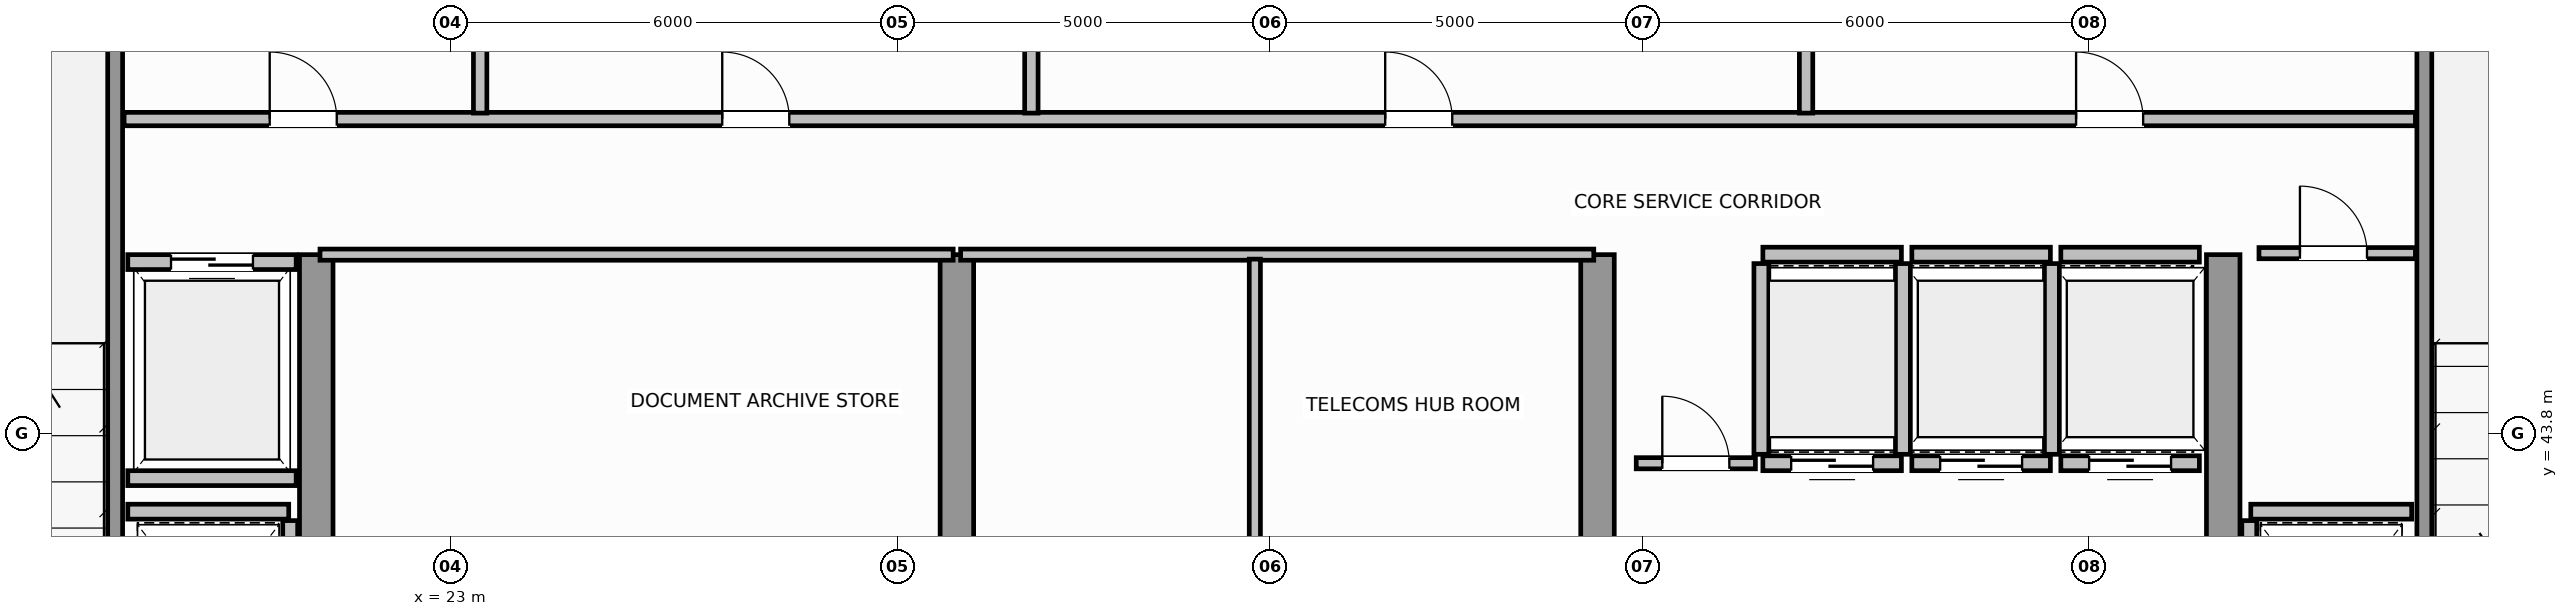
"""IFC4 building model, lengths in metres.
Left out: names, types, materials, properties, quantities, classifications, styles, units other than length and angle.
Written with IfcOpenShell. Run it as: python <this file> out.ifc"""

import sys

from ifc_helpers import new_model, si_unit, direction, frame, frame_2d, origin, place, context, subcontext, project, spatial, rectangle, extrude, source, transform, mapped, element, fill, save


model = new_model("IFC4")
c1 = context("Model", 3, precision=1e-05, world=origin(), true_north=direction((0.0, 1.0)))
c2 = subcontext(c1, "Body", "Model", "MODEL_VIEW")
j1 = project(units=[si_unit("LENGTHUNIT", "METRE"), si_unit("PLANEANGLEUNIT", "RADIAN")], contexts=[c1])
p1 = place(None, origin())
s1 = spatial("IfcSite", under=j1, at=p1, CompositionType="ELEMENT")
p2 = place(p1, origin())
s2 = spatial("IfcBuilding", under=s1, at=p2, CompositionType="ELEMENT")
p3 = place(p2, frame((0.0, 0.0, 268.8)))
s3 = spatial("IfcBuildingStorey", under=s2, at=p3, CompositionType="ELEMENT", Elevation=268.8)
for number, where, z_axis, x_axis in (
    (1, (21.2, 36.745, 0.0), (0.0, 0.0, 1.0), (0.0, 1.0, 0.0)),
    (2, (29.8, 36.745, 0.0), (0.0, 0.0, 1.0), (0.0, 1.0, 0.0)),
    (3, (38.4, 36.745, 0.0), (0.0, 0.0, 1.0), (0.0, 1.0, 0.0)),
    (4, (46.8, 36.745, 0.0), (0.0, 0.0, 1.0), (0.0, 1.0, 0.0)),
):
    element("IfcWall", number, at=place(p3, frame(where, z_axis=z_axis, x_axis=x_axis)), inside=s3, PredefinedType="SHEAR", context=c2, shape_type="SweptSolid", body=[
        extrude(rectangle(XDim=9.455, YDim=0.45, at=frame_2d((4.728, 0.0))), origin(), (0.0, 0.0, 1.0), 3.8),
    ])
for number, where, z_axis, x_axis in (
    (5, (18.5, 39.96, 0.0), (0.0, 0.0, 1.0), (0.0, 1.0, 0.0)),
    (6, (49.5, 39.96, 0.0), (0.0, 0.0, 1.0), (0.0, 1.0, 0.0)),
):
    element("IfcWall", number, at=place(p3, frame(where, z_axis=z_axis, x_axis=x_axis)), inside=s3, PredefinedType="SOLIDWALL", context=c2, shape_type="SweptSolid", body=[
        extrude(rectangle(XDim=9.93, YDim=0.2, at=frame_2d((4.965, 0.0))), origin(), (0.0, 0.0, 1.0), 3.8),
    ])
p4 = place(p3, frame((40.62, 43.4, 0.0), z_axis=(0.0, 0.0, 1.0), x_axis=(1.0, 0.0, 0.0)))
e7 = element("IfcWall", 7, at=p4, inside=s3, PredefinedType="SOLIDWALL", context=c2, shape_type="SweptSolid", body=[
    extrude(rectangle(XDim=1.86, YDim=0.2, at=frame_2d((0.93, 0.0))), origin(), (0.0, 0.0, 1.0), 3.58),
])
p5 = place(p4, frame((0.38, 0.0, 0.0)))
e8 = element("IfcOpeningElement", 8, at=p5, cuts=e7, PredefinedType="OPENING", context=c2, shape_type="SweptSolid", body=[
    extrude(rectangle(XDim=1.1, YDim=2.15, at=frame_2d((0.55, 1.075))), frame((0.0, 0.11, 0.0), z_axis=(0.0, -1.0, 0.0), x_axis=(1.0, 0.0, 0.0)), (0.0, 0.0, 1.0), 0.22),
])
p6 = place(p3, frame((40.62, 46.2, 0.0), z_axis=(0.0, 0.0, 1.0), x_axis=(1.0, 0.0, 0.0)))
e9 = element("IfcWall", 9, at=p6, inside=s3, PredefinedType="SOLIDWALL", context=c2, shape_type="SweptSolid", body=[
    extrude(rectangle(XDim=1.86, YDim=0.2, at=frame_2d((0.93, 0.0))), origin(), (0.0, 0.0, 1.0), 3.58),
])
for number, where, z_axis, x_axis in (
    (10, (40.6, 43.52, 0.0), (0.0, 0.0, 1.0), (0.0, 1.0, 0.0)),
    (11, (42.5, 43.52, 0.0), (0.0, 0.0, 1.0), (0.0, 1.0, 0.0)),
):
    element("IfcWall", number, at=place(p3, frame(where, z_axis=z_axis, x_axis=x_axis)), inside=s3, PredefinedType="SOLIDWALL", context=c2, shape_type="SweptSolid", body=[
        extrude(rectangle(XDim=2.56, YDim=0.2, at=frame_2d((1.28, 0.0))), origin(), (0.0, 0.0, 1.0), 3.58),
    ])
p7 = place(p3, frame((42.62, 43.4, 0.0), z_axis=(0.0, 0.0, 1.0), x_axis=(1.0, 0.0, 0.0)))
e12 = element("IfcWall", 12, at=p7, inside=s3, PredefinedType="SOLIDWALL", context=c2, shape_type="SweptSolid", body=[
    extrude(rectangle(XDim=1.86, YDim=0.2, at=frame_2d((0.93, 0.0))), origin(), (0.0, 0.0, 1.0), 3.58),
])
p8 = place(p7, frame((0.38, 0.0, 0.0)))
e13 = element("IfcOpeningElement", 13, at=p8, cuts=e12, PredefinedType="OPENING", context=c2, shape_type="SweptSolid", body=[
    extrude(rectangle(XDim=1.1, YDim=2.15, at=frame_2d((0.55, 1.075))), frame((0.0, 0.11, 0.0), z_axis=(0.0, -1.0, 0.0), x_axis=(1.0, 0.0, 0.0)), (0.0, 0.0, 1.0), 0.22),
])
p9 = place(p3, frame((42.62, 46.2, 0.0), z_axis=(0.0, 0.0, 1.0), x_axis=(1.0, 0.0, 0.0)))
e14 = element("IfcWall", 14, at=p9, inside=s3, PredefinedType="SOLIDWALL", context=c2, shape_type="SweptSolid", body=[
    extrude(rectangle(XDim=1.86, YDim=0.2, at=frame_2d((0.93, 0.0))), origin(), (0.0, 0.0, 1.0), 3.58),
])
p10 = place(p3, frame((44.5, 43.52, 0.0), z_axis=(0.0, 0.0, 1.0), x_axis=(0.0, 1.0, 0.0)))
e15 = element("IfcWall", 15, at=p10, inside=s3, PredefinedType="SOLIDWALL", context=c2, shape_type="SweptSolid", body=[
    extrude(rectangle(XDim=2.56, YDim=0.2, at=frame_2d((1.28, 0.0))), origin(), (0.0, 0.0, 1.0), 3.58),
])
p11 = place(p3, frame((44.62, 43.4, 0.0), z_axis=(0.0, 0.0, 1.0), x_axis=(1.0, 0.0, 0.0)))
e16 = element("IfcWall", 16, at=p11, inside=s3, PredefinedType="SOLIDWALL", context=c2, shape_type="SweptSolid", body=[
    extrude(rectangle(XDim=1.86, YDim=0.2, at=frame_2d((0.93, 0.0))), origin(), (0.0, 0.0, 1.0), 3.58),
])
p12 = place(p11, frame((0.38, 0.0, 0.0)))
e17 = element("IfcOpeningElement", 17, at=p12, cuts=e16, PredefinedType="OPENING", context=c2, shape_type="SweptSolid", body=[
    extrude(rectangle(XDim=1.1, YDim=2.15, at=frame_2d((0.55, 1.075))), frame((0.0, 0.11, 0.0), z_axis=(0.0, -1.0, 0.0), x_axis=(1.0, 0.0, 0.0)), (0.0, 0.0, 1.0), 0.22),
])
p13 = place(p3, frame((44.62, 46.2, 0.0), z_axis=(0.0, 0.0, 1.0), x_axis=(1.0, 0.0, 0.0)))
e18 = element("IfcWall", 18, at=p13, inside=s3, PredefinedType="SOLIDWALL", context=c2, shape_type="SweptSolid", body=[
    extrude(rectangle(XDim=1.86, YDim=0.2, at=frame_2d((0.93, 0.0))), origin(), (0.0, 0.0, 1.0), 3.58),
])
p14 = place(p3, frame((18.67, 46.1, 0.0), z_axis=(0.0, 0.0, 1.0), x_axis=(1.0, 0.0, 0.0)))
e19 = element("IfcWall", 19, at=p14, inside=s3, PredefinedType="SOLIDWALL", context=c2, shape_type="SweptSolid", body=[
    extrude(rectangle(XDim=2.26, YDim=0.2, at=frame_2d((1.13, 0.0))), origin(), (0.0, 0.0, 1.0), 3.58),
])
p15 = place(p14, frame((0.58, 0.0, 0.0)))
e20 = element("IfcOpeningElement", 20, at=p15, cuts=e19, PredefinedType="OPENING", context=c2, shape_type="SweptSolid", body=[
    extrude(rectangle(XDim=1.1, YDim=2.15, at=frame_2d((0.55, 1.075))), frame((0.0, 0.11, 0.0), z_axis=(0.0, -1.0, 0.0), x_axis=(1.0, 0.0, 0.0)), (0.0, 0.0, 1.0), 0.22),
])
p16 = place(p3, frame((18.67, 43.2, 0.0), z_axis=(0.0, 0.0, 1.0), x_axis=(1.0, 0.0, 0.0)))
e21 = element("IfcWall", 21, at=p16, inside=s3, PredefinedType="SOLIDWALL", context=c2, shape_type="SweptSolid", body=[
    extrude(rectangle(XDim=2.26, YDim=0.2, at=frame_2d((1.13, 0.0))), origin(), (0.0, 0.0, 1.0), 3.58),
])
p17 = place(p3, frame((18.67, 42.75, 0.0), z_axis=(0.0, 0.0, 1.0), x_axis=(1.0, 0.0, 0.0)))
e22 = element("IfcWall", 22, at=p17, inside=s3, PredefinedType="SOLIDWALL", context=c2, shape_type="SweptSolid", body=[
    extrude(rectangle(XDim=2.16, YDim=0.2, at=frame_2d((1.08, 0.0))), origin(), (0.0, 0.0, 1.0), 3.58),
])
p18 = place(p3, frame((20.85, 40.07, 0.0), z_axis=(0.0, 0.0, 1.0), x_axis=(0.0, 1.0, 0.0)))
e23 = element("IfcWall", 23, at=p18, inside=s3, PredefinedType="SOLIDWALL", context=c2, shape_type="SweptSolid", body=[
    extrude(rectangle(XDim=2.56, YDim=0.2, at=frame_2d((1.28, 0.0))), origin(), (0.0, 0.0, 1.0), 3.58),
])
p19 = place(p3, frame((47.17, 42.75, 0.0), z_axis=(0.0, 0.0, 1.0), x_axis=(1.0, 0.0, 0.0)))
e24 = element("IfcWall", 24, at=p19, inside=s3, PredefinedType="SOLIDWALL", context=c2, shape_type="SweptSolid", body=[
    extrude(rectangle(XDim=2.16, YDim=0.2, at=frame_2d((1.08, 0.0))), origin(), (0.0, 0.0, 1.0), 3.58),
])
p20 = place(p3, frame((47.15, 40.07, 0.0), z_axis=(0.0, 0.0, 1.0), x_axis=(0.0, 1.0, 0.0)))
e25 = element("IfcWall", 25, at=p20, inside=s3, PredefinedType="SOLIDWALL", context=c2, shape_type="SweptSolid", body=[
    extrude(rectangle(XDim=2.56, YDim=0.2, at=frame_2d((1.28, 0.0))), origin(), (0.0, 0.0, 1.0), 3.58),
])
for number, where, z_axis, x_axis in (
    (26, (21.25, 46.2, 0.0), (0.0, 0.0, 1.0), (1.0, 0.0, 0.0)),
    (27, (29.85, 46.2, 0.0), (0.0, 0.0, 1.0), (1.0, 0.0, 0.0)),
):
    element("IfcWall", number, at=place(p3, frame(where, z_axis=z_axis, x_axis=x_axis)), inside=s3, PredefinedType="PARTITIONING", context=c2, shape_type="SweptSolid", body=[
        extrude(rectangle(XDim=8.5, YDim=0.15, at=frame_2d((4.25, 0.0))), origin(), (0.0, 0.0, 1.0), 3.58),
    ])
p21 = place(p3, frame((33.8, 36.56, 0.0), z_axis=(0.0, 0.0, 1.0), x_axis=(0.0, 1.0, 0.0)))
e28 = element("IfcWall", 28, at=p21, inside=s3, PredefinedType="PARTITIONING", context=c2, shape_type="SweptSolid", body=[
    extrude(rectangle(XDim=9.58, YDim=0.15, at=frame_2d((4.79, 0.0))), origin(), (0.0, 0.0, 1.0), 3.58),
])
p22 = place(p21, frame((4.2, 0.0, 0.0)))
e29 = element("IfcOpeningElement", 29, at=p22, cuts=e28, PredefinedType="OPENING", context=c2, shape_type="SweptSolid", body=[
    extrude(rectangle(XDim=0.9, YDim=2.1, at=frame_2d((0.45, 1.05))), frame((0.0, 0.085, 0.0), z_axis=(0.0, -1.0, 0.0), x_axis=(1.0, 0.0, 0.0)), (0.0, 0.0, 1.0), 0.17),
])
p23 = place(p3, frame((47.28, 46.22, 0.0), z_axis=(0.0, 0.0, 1.0), x_axis=(1.0, 0.0, 0.0)))
e30 = element("IfcWall", 30, at=p23, inside=s3, PredefinedType="PARTITIONING", context=c2, shape_type="SweptSolid", body=[
    extrude(rectangle(XDim=2.1, YDim=0.15, at=frame_2d((1.05, 0.0))), origin(), (0.0, 0.0, 1.0), 3.58),
])
p24 = place(p23, frame((0.55, 0.0, 0.0)))
e31 = element("IfcOpeningElement", 31, at=p24, cuts=e30, PredefinedType="OPENING", context=c2, shape_type="SweptSolid", body=[
    extrude(rectangle(XDim=0.9, YDim=2.1, at=frame_2d((0.45, 1.05))), frame((0.0, 0.085, 0.0), z_axis=(0.0, -1.0, 0.0), x_axis=(1.0, 0.0, 0.0)), (0.0, 0.0, 1.0), 0.17),
])
p25 = place(p3, frame((38.92, 43.4, 0.0), z_axis=(0.0, 0.0, 1.0), x_axis=(1.0, 0.0, 0.0)))
e32 = element("IfcWall", 32, at=p25, inside=s3, PredefinedType="PARTITIONING", context=c2, shape_type="SweptSolid", body=[
    extrude(rectangle(XDim=1.6, YDim=0.15, at=frame_2d((0.8, 0.0))), origin(), (0.0, 0.0, 1.0), 3.58),
])
p26 = place(p25, frame((0.35, 0.0, 0.0)))
e33 = element("IfcOpeningElement", 33, at=p26, cuts=e32, PredefinedType="OPENING", context=c2, shape_type="SweptSolid", body=[
    extrude(rectangle(XDim=0.9, YDim=2.1, at=frame_2d((0.45, 1.05))), frame((0.0, 0.085, 0.0), z_axis=(0.0, -1.0, 0.0), x_axis=(1.0, 0.0, 0.0)), (0.0, 0.0, 1.0), 0.17),
])
p27 = place(p3, frame((18.62, 48.02, 0.0), z_axis=(0.0, 0.0, 1.0), x_axis=(1.0, 0.0, 0.0)))
e34 = element("IfcWall", 34, at=p27, inside=s3, PredefinedType="PLUMBINGWALL", context=c2, shape_type="SweptSolid", body=[
    extrude(rectangle(XDim=30.76, YDim=0.18, at=frame_2d((15.38, 0.0))), origin(), (0.0, 0.0, 1.0), 3.58),
])
p28 = place(p27, frame((1.955, 0.0, 0.0)))
e35 = element("IfcOpeningElement", 35, at=p28, cuts=e34, PredefinedType="OPENING", context=c2, shape_type="SweptSolid", body=[
    extrude(rectangle(XDim=0.9, YDim=2.15, at=frame_2d((0.45, 1.075))), frame((0.0, 0.1, 0.0), z_axis=(0.0, -1.0, 0.0), x_axis=(1.0, 0.0, 0.0)), (0.0, 0.0, 1.0), 0.2),
])
p29 = place(p27, frame((8.03, 0.0, 0.0)))
e36 = element("IfcOpeningElement", 36, at=p29, cuts=e34, PredefinedType="OPENING", context=c2, shape_type="SweptSolid", body=[
    extrude(rectangle(XDim=0.9, YDim=2.15, at=frame_2d((0.45, 1.075))), frame((0.0, 0.1, 0.0), z_axis=(0.0, -1.0, 0.0), x_axis=(1.0, 0.0, 0.0)), (0.0, 0.0, 1.0), 0.2),
])
p30 = place(p27, frame((16.93, 0.0, 0.0)))
e37 = element("IfcOpeningElement", 37, at=p30, cuts=e34, PredefinedType="OPENING", context=c2, shape_type="SweptSolid", body=[
    extrude(rectangle(XDim=0.9, YDim=2.15, at=frame_2d((0.45, 1.075))), frame((0.0, 0.1, 0.0), z_axis=(0.0, -1.0, 0.0), x_axis=(1.0, 0.0, 0.0)), (0.0, 0.0, 1.0), 0.2),
])
p31 = place(p27, frame((26.205, 0.0, 0.0)))
e38 = element("IfcOpeningElement", 38, at=p31, cuts=e34, PredefinedType="OPENING", context=c2, shape_type="SweptSolid", body=[
    extrude(rectangle(XDim=0.9, YDim=2.15, at=frame_2d((0.45, 1.075))), frame((0.0, 0.1, 0.0), z_axis=(0.0, -1.0, 0.0), x_axis=(1.0, 0.0, 0.0)), (0.0, 0.0, 1.0), 0.2),
])
for number, where, z_axis, x_axis in (
    (39, (23.4, 48.1, 0.0), (0.0, 0.0, 1.0), (0.0, 1.0, 0.0)),
    (40, (30.8, 48.1, 0.0), (0.0, 0.0, 1.0), (0.0, 1.0, 0.0)),
    (41, (41.2, 48.1, 0.0), (0.0, 0.0, 1.0), (0.0, 1.0, 0.0)),
):
    element("IfcWall", number, at=place(p3, frame(where, z_axis=z_axis, x_axis=x_axis)), inside=s3, PredefinedType="PLUMBINGWALL", context=c2, shape_type="SweptSolid", body=[
        extrude(rectangle(XDim=2.43, YDim=0.18, at=frame_2d((1.215, 0.0))), origin(), (0.0, 0.0, 1.0), 3.58),
    ])
m1 = source(origin(), c2, "Body", "SweptSolid", [
    extrude(rectangle(XDim=1.1, YDim=2.15, at=frame_2d((0.55, 1.075))), frame((0.0, 0.025, 0.0), z_axis=(0.0, -1.0, 0.0), x_axis=(1.0, 0.0, 0.0)), (0.0, 0.0, 1.0), 0.05),
])
p32 = place(p5, origin())
e42 = element("IfcDoor", 42, at=p32, inside=s3, OperationType="DOUBLE_DOOR_SLIDING", PredefinedType="DOOR", context=c2, shape_type="MappedRepresentation", body=[
    mapped(m1, transform((0.0, 0.0, 0.0), scale=1.0)),
])
fill(e8, e42)
p33 = place(p8, origin())
e43 = element("IfcDoor", 43, at=p33, inside=s3, OperationType="DOUBLE_DOOR_SLIDING", PredefinedType="DOOR", context=c2, shape_type="MappedRepresentation", body=[
    mapped(m1, transform((0.0, 0.0, 0.0), scale=1.0)),
])
fill(e13, e43)
p34 = place(p12, origin())
e44 = element("IfcDoor", 44, at=p34, inside=s3, OperationType="DOUBLE_DOOR_SLIDING", PredefinedType="DOOR", context=c2, shape_type="MappedRepresentation", body=[
    mapped(m1, transform((0.0, 0.0, 0.0), scale=1.0)),
])
fill(e17, e44)
p35 = place(p15, origin())
e45 = element("IfcDoor", 45, at=p35, inside=s3, OperationType="DOUBLE_DOOR_SLIDING", PredefinedType="DOOR", context=c2, shape_type="MappedRepresentation", body=[
    mapped(m1, transform((0.0, 0.0, 0.0), scale=1.0)),
])
fill(e20, e45)
m2 = source(origin(), c2, "Body", "SweptSolid", [
    extrude(rectangle(XDim=0.9, YDim=2.1, at=frame_2d((0.45, 1.05))), frame((0.0, 0.025, 0.0), z_axis=(0.0, -1.0, 0.0), x_axis=(1.0, 0.0, 0.0)), (0.0, 0.0, 1.0), 0.05),
])
p36 = place(p24, origin())
e46 = element("IfcDoor", 46, at=p36, inside=s3, OperationType="SINGLE_SWING_RIGHT", PredefinedType="DOOR", context=c2, shape_type="MappedRepresentation", body=[
    mapped(m2, transform((0.0, 0.0, 0.0), scale=1.0)),
])
fill(e31, e46)
p37 = place(p26, origin())
e47 = element("IfcDoor", 47, at=p37, inside=s3, OperationType="SINGLE_SWING_LEFT", PredefinedType="DOOR", context=c2, shape_type="MappedRepresentation", body=[
    mapped(m2, transform((0.0, 0.0, 0.0), scale=1.0)),
])
fill(e33, e47)
m3 = source(origin(), c2, "Body", "SweptSolid", [
    extrude(rectangle(XDim=0.9, YDim=2.15, at=frame_2d((0.45, 1.075))), frame((0.0, 0.025, 0.0), z_axis=(0.0, -1.0, 0.0), x_axis=(1.0, 0.0, 0.0)), (0.0, 0.0, 1.0), 0.05),
])
p38 = place(p28, origin())
e48 = element("IfcDoor", 48, at=p38, inside=s3, OperationType="SINGLE_SWING_LEFT", PredefinedType="DOOR", context=c2, shape_type="MappedRepresentation", body=[
    mapped(m3, transform((0.0, 0.0, 0.0), scale=1.0)),
])
fill(e35, e48)
p39 = place(p29, origin())
e49 = element("IfcDoor", 49, at=p39, inside=s3, OperationType="SINGLE_SWING_RIGHT", PredefinedType="DOOR", context=c2, shape_type="MappedRepresentation", body=[
    mapped(m3, transform((0.0, 0.0, 0.0), scale=1.0)),
])
fill(e36, e49)
p40 = place(p30, origin())
e50 = element("IfcDoor", 50, at=p40, inside=s3, OperationType="SINGLE_SWING_LEFT", PredefinedType="DOOR", context=c2, shape_type="MappedRepresentation", body=[
    mapped(m3, transform((0.0, 0.0, 0.0), scale=1.0)),
])
fill(e37, e50)
p41 = place(p31, origin())
e51 = element("IfcDoor", 51, at=p41, inside=s3, OperationType="SINGLE_SWING_RIGHT", PredefinedType="DOOR", context=c2, shape_type="MappedRepresentation", body=[
    mapped(m3, transform((0.0, 0.0, 0.0), scale=1.0)),
])
fill(e38, e51)
save(model, sys.argv[1])
